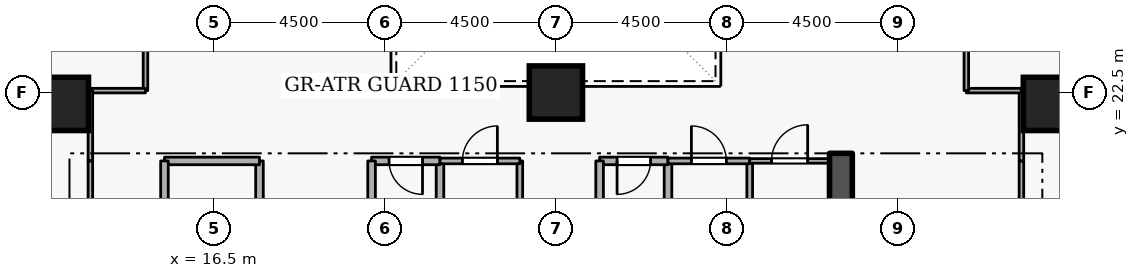
"""IFC4 building model, lengths in metres.
Left out: names, types, materials, properties, quantities, classifications, styles, units other than length and angle.
Written with IfcOpenShell. Run it as: python <this file> out.ifc"""

import sys

from ifc_helpers import new_model, si_unit, direction, frame, frame_2d, origin, origin_2d, place, context, subcontext, project, spatial, rectangle, extrude, element, fill, save


model = new_model("IFC4")
c1 = context("Model", 3, precision=1e-05, world=origin(), true_north=direction((0.0, 1.0)))
c2 = subcontext(c1, "Body", "Model", "MODEL_VIEW")
j1 = project(units=[si_unit("LENGTHUNIT", "METRE"), si_unit("PLANEANGLEUNIT", "RADIAN")], contexts=[c1])
p1 = place(None, origin())
s1 = spatial("IfcSite", under=j1, at=p1, CompositionType="ELEMENT")
p2 = place(p1, origin())
s2 = spatial("IfcBuilding", under=s1, at=p2, CompositionType="ELEMENT")
p3 = place(p2, frame((0.0, 0.0, 53.7)))
s3 = spatial("IfcBuildingStorey", under=s2, at=p3, CompositionType="ELEMENT", Elevation=53.7)
p4 = place(p3, frame((33.0, 15.2, 0.0), z_axis=(0.0, 0.0, 1.0), x_axis=(0.0, 1.0, 0.0)))
e1 = element("IfcWall", 1, at=p4, inside=s3, PredefinedType="SHEAR", context=c2, shape_type="SweptSolid", body=[
    extrude(rectangle(XDim=5.7, YDim=0.6, at=frame_2d((2.85, 0.0))), origin(), (0.0, 0.0, 1.0), 3.6),
])
for number, where, z_axis, x_axis in (
    (2, (12.5, 22.2, 0.0), (0.0, 0.0, 1.0), (1.0, 0.0, 0.0)),
    (3, (38.5, 22.2, 0.0), (0.0, 0.0, 1.0), (1.0, 0.0, 0.0)),
    (4, (25.5, 22.5, 0.0), (0.0, 0.0, 1.0), (1.0, 0.0, 0.0)),
):
    element("IfcColumn", number, at=place(p3, frame(where, z_axis=z_axis, x_axis=x_axis)), inside=s3, PredefinedType="COLUMN", context=c2, shape_type="SweptSolid", body=[
        extrude(rectangle(XDim=1.4, YDim=1.4, at=origin_2d()), origin(), (0.0, 0.0, 1.0), 3.6),
    ])
p5 = place(p3, frame((17.7, 18.4, 0.0), z_axis=(0.0, 0.0, 1.0), x_axis=(0.0, 1.0, 0.0)))
e5 = element("IfcWall", 5, at=p5, inside=s3, PredefinedType="STANDARD", context=c2, shape_type="SweptSolid", body=[
    extrude(rectangle(XDim=2.3, YDim=0.2, at=frame_2d((1.15, 0.0))), origin(), (0.0, 0.0, 1.0), 2.545),
])
p6 = place(p3, frame((17.7, 20.7, 0.0), z_axis=(0.0, 0.0, 1.0), x_axis=(-1.0, 0.0, 0.0)))
e6 = element("IfcWall", 6, at=p6, inside=s3, PredefinedType="STANDARD", context=c2, shape_type="SweptSolid", body=[
    extrude(rectangle(XDim=2.5, YDim=0.2, at=frame_2d((1.25, 0.0))), origin(), (0.0, 0.0, 1.0), 3.34),
])
p7 = place(p3, frame((15.2, 20.7, 0.0), z_axis=(0.0, 0.0, 1.0), x_axis=(0.0, -1.0, 0.0)))
e7 = element("IfcWall", 7, at=p7, inside=s3, PredefinedType="STANDARD", context=c2, shape_type="SweptSolid", body=[
    extrude(rectangle(XDim=5.7, YDim=0.2, at=frame_2d((2.85, 0.0))), origin(), (0.0, 0.0, 1.0), 3.34),
])
p8 = place(p7, frame((2.275, 0.0, 0.0)))
e8 = element("IfcOpeningElement", 8, at=p8, cuts=e7, PredefinedType="OPENING", context=c2, shape_type="SweptSolid", body=[
    extrude(rectangle(XDim=1.15, YDim=2.1, at=frame_2d((0.575, 1.05))), frame((0.0, 0.11, 0.0), z_axis=(0.0, -1.0, 0.0), x_axis=(1.0, 0.0, 0.0)), (0.0, 0.0, 1.0), 0.22),
])
p9 = place(p3, frame((28.45, 18.65, 0.0), z_axis=(0.0, 0.0, 1.0), x_axis=(0.0, 1.0, 0.0)))
e9 = element("IfcWall", 9, at=p9, inside=s3, PredefinedType="STANDARD", context=c2, shape_type="SweptSolid", body=[
    extrude(rectangle(XDim=2.05, YDim=0.2, at=frame_2d((1.025, 0.0))), origin(), (0.0, 0.0, 1.0), 3.34),
])
p10 = place(p3, frame((28.45, 20.7, 0.0), z_axis=(0.0, 0.0, 1.0), x_axis=(-1.0, 0.0, 0.0)))
e10 = element("IfcWall", 10, at=p10, inside=s3, PredefinedType="STANDARD", context=c2, shape_type="SweptSolid", body=[
    extrude(rectangle(XDim=1.8, YDim=0.2, at=frame_2d((0.9, 0.0))), origin(), (0.0, 0.0, 1.0), 3.34),
])
p11 = place(p10, frame((0.46, 0.0, 0.0)))
e11 = element("IfcOpeningElement", 11, at=p11, cuts=e10, PredefinedType="OPENING", context=c2, shape_type="SweptSolid", body=[
    extrude(rectangle(XDim=0.88, YDim=2.04, at=frame_2d((0.44, 1.02))), frame((0.0, 0.11, 0.0), z_axis=(0.0, -1.0, 0.0), x_axis=(1.0, 0.0, 0.0)), (0.0, 0.0, 1.0), 0.22),
])
for number, where, z_axis, x_axis in (
    (12, (26.65, 20.7, 0.0), (0.0, 0.0, 1.0), (0.0, -1.0, 0.0)),
    (13, (22.45, 18.65, 0.0), (0.0, 0.0, 1.0), (0.0, 1.0, 0.0)),
):
    element("IfcWall", number, at=place(p3, frame(where, z_axis=z_axis, x_axis=x_axis)), inside=s3, PredefinedType="STANDARD", context=c2, shape_type="SweptSolid", body=[
        extrude(rectangle(XDim=2.05, YDim=0.2, at=frame_2d((1.025, 0.0))), origin(), (0.0, 0.0, 1.0), 3.34),
    ])
p12 = place(p3, frame((22.45, 20.7, 0.0), z_axis=(0.0, 0.0, 1.0), x_axis=(-1.0, 0.0, 0.0)))
e14 = element("IfcWall", 14, at=p12, inside=s3, PredefinedType="STANDARD", context=c2, shape_type="SweptSolid", body=[
    extrude(rectangle(XDim=1.8, YDim=0.2, at=frame_2d((0.9, 0.0))), origin(), (0.0, 0.0, 1.0), 3.34),
])
p13 = place(p12, frame((0.46, 0.0, 0.0)))
e15 = element("IfcOpeningElement", 15, at=p13, cuts=e14, PredefinedType="OPENING", context=c2, shape_type="SweptSolid", body=[
    extrude(rectangle(XDim=0.88, YDim=2.04, at=frame_2d((0.44, 1.02))), frame((0.0, 0.11, 0.0), z_axis=(0.0, -1.0, 0.0), x_axis=(1.0, 0.0, 0.0)), (0.0, 0.0, 1.0), 0.22),
])
p14 = place(p3, frame((20.65, 20.7, 0.0), z_axis=(0.0, 0.0, 1.0), x_axis=(0.0, -1.0, 0.0)))
e16 = element("IfcWall", 16, at=p14, inside=s3, PredefinedType="STANDARD", context=c2, shape_type="SweptSolid", body=[
    extrude(rectangle(XDim=2.05, YDim=0.2, at=frame_2d((1.025, 0.0))), origin(), (0.0, 0.0, 1.0), 3.34),
])
p15 = place(p3, frame((24.55, 20.7, 0.0), z_axis=(0.0, 0.0, 1.0), x_axis=(0.0, -1.0, 0.0)))
e17 = element("IfcWall", 17, at=p15, inside=s3, PredefinedType="PARTITIONING", context=c2, shape_type="SweptSolid", body=[
    extrude(rectangle(XDim=2.05, YDim=0.15, at=frame_2d((1.025, 0.0))), origin(), (0.0, 0.0, 1.0), 3.34),
])
p16 = place(p3, frame((22.45, 20.7, 0.0), z_axis=(0.0, 0.0, 1.0), x_axis=(1.0, 0.0, 0.0)))
e18 = element("IfcWall", 18, at=p16, inside=s3, PredefinedType="PARTITIONING", context=c2, shape_type="SweptSolid", body=[
    extrude(rectangle(XDim=2.1, YDim=0.15, at=frame_2d((1.05, 0.0))), origin(), (0.0, 0.0, 1.0), 3.34),
])
p17 = place(p16, frame((0.59, 0.0, 0.0)))
e19 = element("IfcOpeningElement", 19, at=p17, cuts=e18, PredefinedType="OPENING", context=c2, shape_type="SweptSolid", body=[
    extrude(rectangle(XDim=0.92, YDim=2.08, at=frame_2d((0.46, 1.04))), frame((0.0, 0.085, 0.0), z_axis=(0.0, -1.0, 0.0), x_axis=(1.0, 0.0, 0.0)), (0.0, 0.0, 1.0), 0.17),
])
p18 = place(p3, frame((30.6, 20.7, 0.0), z_axis=(0.0, 0.0, 1.0), x_axis=(0.0, -1.0, 0.0)))
e20 = element("IfcWall", 20, at=p18, inside=s3, PredefinedType="PARTITIONING", context=c2, shape_type="SweptSolid", body=[
    extrude(rectangle(XDim=2.05, YDim=0.15, at=frame_2d((1.025, 0.0))), origin(), (0.0, 0.0, 1.0), 3.34),
])
p19 = place(p3, frame((28.45, 20.7, 0.0), z_axis=(0.0, 0.0, 1.0), x_axis=(1.0, 0.0, 0.0)))
e21 = element("IfcWall", 21, at=p19, inside=s3, PredefinedType="PARTITIONING", context=c2, shape_type="SweptSolid", body=[
    extrude(rectangle(XDim=2.15, YDim=0.15, at=frame_2d((1.075, 0.0))), origin(), (0.0, 0.0, 1.0), 3.34),
])
p20 = place(p19, frame((0.615, 0.0, 0.0)))
e22 = element("IfcOpeningElement", 22, at=p20, cuts=e21, PredefinedType="OPENING", context=c2, shape_type="SweptSolid", body=[
    extrude(rectangle(XDim=0.92, YDim=2.08, at=frame_2d((0.46, 1.04))), frame((0.0, 0.085, 0.0), z_axis=(0.0, -1.0, 0.0), x_axis=(1.0, 0.0, 0.0)), (0.0, 0.0, 1.0), 0.17),
])
p21 = place(p3, frame((30.6, 20.7, 0.0), z_axis=(0.0, 0.0, 1.0), x_axis=(1.0, 0.0, 0.0)))
e23 = element("IfcWall", 23, at=p21, inside=s3, PredefinedType="PARTITIONING", context=c2, shape_type="SweptSolid", body=[
    extrude(rectangle(XDim=2.1, YDim=0.12, at=frame_2d((1.05, 0.0))), origin(), (0.0, 0.0, 1.0), 3.34),
])
p22 = place(p21, frame((0.575, 0.0, 0.0)))
e24 = element("IfcOpeningElement", 24, at=p22, cuts=e23, PredefinedType="OPENING", context=c2, shape_type="SweptSolid", body=[
    extrude(rectangle(XDim=0.95, YDim=2.1, at=frame_2d((0.475, 1.05))), frame((0.0, 0.07, 0.0), z_axis=(0.0, -1.0, 0.0), x_axis=(1.0, 0.0, 0.0)), (0.0, 0.0, 1.0), 0.14),
])
p23 = place(p3, frame((14.7, 27.0, 0.0), z_axis=(0.0, 0.0, 1.0), x_axis=(0.0, -1.0, 0.0)))
e25 = element("IfcWall", 25, at=p23, inside=s3, PredefinedType="PARTITIONING", context=c2, shape_type="SweptSolid", body=[
    extrude(rectangle(XDim=4.45, YDim=0.12, at=frame_2d((2.225, 0.0))), origin(), (0.0, 0.0, 1.0), 3.34),
])
p24 = place(p3, frame((14.7, 22.55, 0.0), z_axis=(0.0, 0.0, 1.0), x_axis=(-1.0, 0.0, 0.0)))
e26 = element("IfcWall", 26, at=p24, inside=s3, PredefinedType="PARTITIONING", context=c2, shape_type="SweptSolid", body=[
    extrude(rectangle(XDim=1.45, YDim=0.12, at=frame_2d((0.725, 0.0))), origin(), (0.0, 0.0, 1.0), 3.34),
])
p25 = place(p3, frame((13.25, 22.55, 0.0), z_axis=(0.0, 0.0, 1.0), x_axis=(0.0, -1.0, 0.0)))
e27 = element("IfcWall", 27, at=p25, inside=s3, PredefinedType="PARTITIONING", context=c2, shape_type="SweptSolid", body=[
    extrude(rectangle(XDim=1.85, YDim=0.12, at=frame_2d((0.925, 0.0))), origin(), (0.0, 0.0, 1.0), 3.34),
])
p26 = place(p3, frame((13.25, 20.7, 0.0), z_axis=(0.0, 0.0, 1.0), x_axis=(0.0, -1.0, 0.0)))
e28 = element("IfcWall", 28, at=p26, inside=s3, PredefinedType="PARTITIONING", context=c2, shape_type="SweptSolid", body=[
    extrude(rectangle(XDim=9.35, YDim=0.12, at=frame_2d((4.675, 0.0))), origin(), (0.0, 0.0, 1.0), 3.34),
])
p27 = place(p26, frame((4.15, 0.0, 0.0)))
e29 = element("IfcOpeningElement", 29, at=p27, cuts=e28, PredefinedType="OPENING", context=c2, shape_type="SweptSolid", body=[
    extrude(rectangle(XDim=1.05, YDim=2.1, at=frame_2d((0.525, 1.05))), frame((0.0, 0.07, 0.0), z_axis=(0.0, -1.0, 0.0), x_axis=(1.0, 0.0, 0.0)), (0.0, 0.0, 1.0), 0.14),
])
p28 = place(p3, frame((37.75, 17.55, 0.0), z_axis=(0.0, 0.0, 1.0), x_axis=(0.0, 1.0, 0.0)))
e30 = element("IfcWall", 30, at=p28, inside=s3, PredefinedType="PARTITIONING", context=c2, shape_type="SweptSolid", body=[
    extrude(rectangle(XDim=3.15, YDim=0.12, at=frame_2d((1.575, 0.0))), origin(), (0.0, 0.0, 1.0), 3.34),
])
p29 = place(p3, frame((37.75, 20.7, 0.0), z_axis=(0.0, 0.0, 1.0), x_axis=(0.0, 1.0, 0.0)))
e31 = element("IfcWall", 31, at=p29, inside=s3, PredefinedType="PARTITIONING", context=c2, shape_type="SweptSolid", body=[
    extrude(rectangle(XDim=1.85, YDim=0.12, at=frame_2d((0.925, 0.0))), origin(), (0.0, 0.0, 1.0), 3.34),
])
p30 = place(p3, frame((37.75, 22.55, 0.0), z_axis=(0.0, 0.0, 1.0), x_axis=(-1.0, 0.0, 0.0)))
e32 = element("IfcWall", 32, at=p30, inside=s3, PredefinedType="PARTITIONING", context=c2, shape_type="SweptSolid", body=[
    extrude(rectangle(XDim=1.45, YDim=0.12, at=frame_2d((0.725, 0.0))), origin(), (0.0, 0.0, 1.0), 3.34),
])
p31 = place(p3, frame((36.3, 22.55, 0.0), z_axis=(0.0, 0.0, 1.0), x_axis=(0.0, 1.0, 0.0)))
e33 = element("IfcWall", 33, at=p31, inside=s3, PredefinedType="PARTITIONING", context=c2, shape_type="SweptSolid", body=[
    extrude(rectangle(XDim=4.45, YDim=0.12, at=frame_2d((2.225, 0.0))), origin(), (0.0, 0.0, 1.0), 3.34),
])
p32 = place(p31, frame((1.7, 0.0, 0.0)))
e34 = element("IfcOpeningElement", 34, at=p32, cuts=e33, PredefinedType="OPENING", context=c2, shape_type="SweptSolid", body=[
    extrude(rectangle(XDim=1.05, YDim=2.1, at=frame_2d((0.525, 1.05))), frame((0.0, 0.07, 0.0), z_axis=(0.0, -1.0, 0.0), x_axis=(1.0, 0.0, 0.0)), (0.0, 0.0, 1.0), 0.14),
])
p33 = place(p11, origin())
e35 = element("IfcDoor", 35, at=p33, inside=s3, OperationType="SINGLE_SWING_RIGHT", PredefinedType="DOOR", context=c2, shape_type="SweptSolid", body=[
    extrude(rectangle(XDim=0.88, YDim=2.04, at=frame_2d((0.44, 1.02))), frame((0.0, 0.025, 0.0), z_axis=(0.0, -1.0, 0.0), x_axis=(1.0, 0.0, 0.0)), (0.0, 0.0, 1.0), 0.05),
])
fill(e11, e35)
p34 = place(p13, origin())
e36 = element("IfcDoor", 36, at=p34, inside=s3, OperationType="SINGLE_SWING_LEFT", PredefinedType="DOOR", context=c2, shape_type="SweptSolid", body=[
    extrude(rectangle(XDim=0.88, YDim=2.04, at=frame_2d((0.44, 1.02))), frame((0.0, 0.025, 0.0), z_axis=(0.0, -1.0, 0.0), x_axis=(1.0, 0.0, 0.0)), (0.0, 0.0, 1.0), 0.05),
])
fill(e15, e36)
p35 = place(p17, origin())
e37 = element("IfcDoor", 37, at=p35, inside=s3, OperationType="SINGLE_SWING_RIGHT", PredefinedType="DOOR", context=c2, shape_type="SweptSolid", body=[
    extrude(rectangle(XDim=0.92, YDim=2.08, at=frame_2d((0.46, 1.04))), frame((0.0, 0.025, 0.0), z_axis=(0.0, -1.0, 0.0), x_axis=(1.0, 0.0, 0.0)), (0.0, 0.0, 1.0), 0.05),
])
fill(e19, e37)
p36 = place(p20, origin())
e38 = element("IfcDoor", 38, at=p36, inside=s3, OperationType="SINGLE_SWING_LEFT", PredefinedType="DOOR", context=c2, shape_type="SweptSolid", body=[
    extrude(rectangle(XDim=0.92, YDim=2.08, at=frame_2d((0.46, 1.04))), frame((0.0, 0.025, 0.0), z_axis=(0.0, -1.0, 0.0), x_axis=(1.0, 0.0, 0.0)), (0.0, 0.0, 1.0), 0.05),
])
fill(e22, e38)
p37 = place(p22, origin())
e39 = element("IfcDoor", 39, at=p37, inside=s3, OperationType="SINGLE_SWING_RIGHT", PredefinedType="DOOR", context=c2, shape_type="SweptSolid", body=[
    extrude(rectangle(XDim=0.95, YDim=2.1, at=frame_2d((0.475, 1.05))), frame((0.0, 0.025, 0.0), z_axis=(0.0, -1.0, 0.0), x_axis=(1.0, 0.0, 0.0)), (0.0, 0.0, 1.0), 0.05),
])
fill(e24, e39)
save(model, sys.argv[1])
